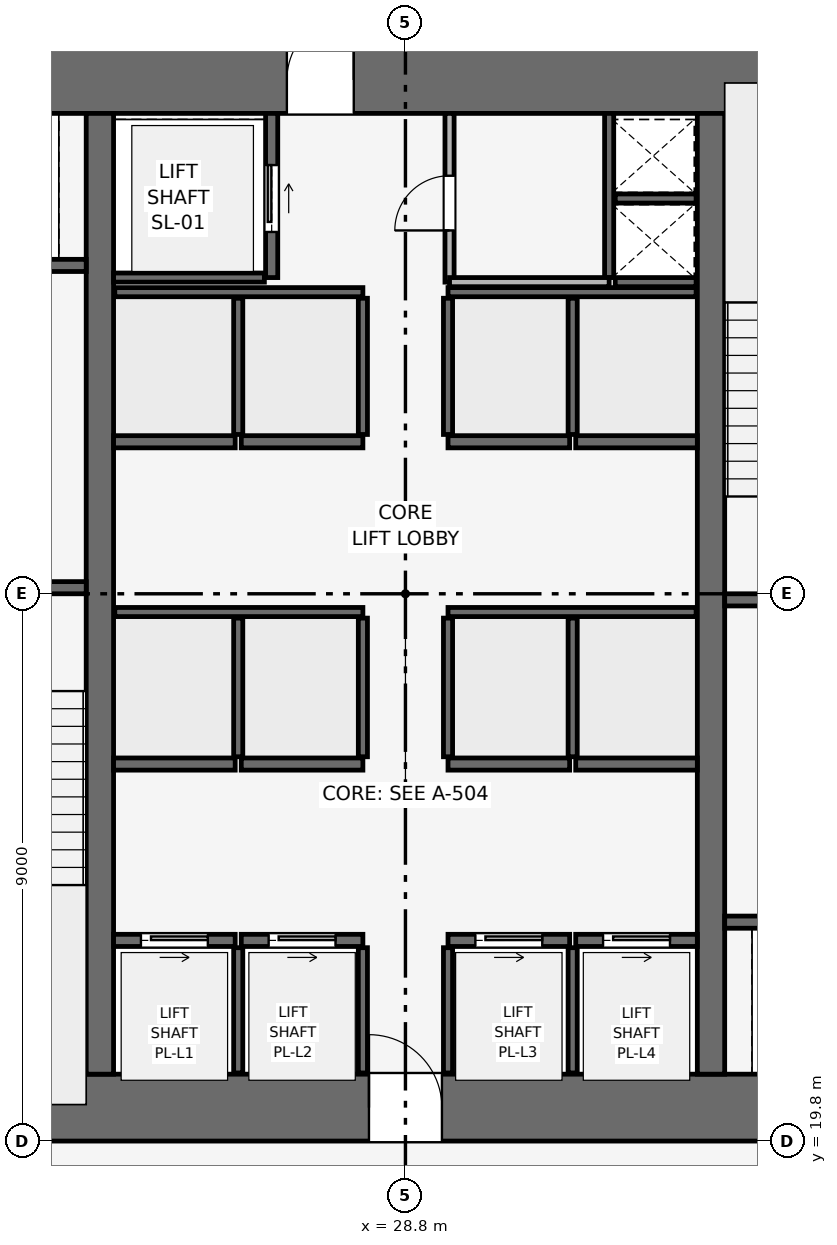
"""IFC4 building model, lengths in metres.
Left out: names, types, materials, properties, quantities, classifications, styles, units other than length and angle.
Written with IfcOpenShell. Run it as: python <this file> out.ifc"""

import sys

from ifc_helpers import new_model, si_unit, direction, frame, frame_2d, origin, place, context, subcontext, project, spatial, rectangle, extrude, element, fill, save


model = new_model("IFC4")
c1 = context("Model", 3, precision=1e-05, world=origin(), true_north=direction((0.0, 1.0)))
c2 = subcontext(c1, "Body", "Model", "MODEL_VIEW")
j1 = project(units=[si_unit("LENGTHUNIT", "METRE"), si_unit("PLANEANGLEUNIT", "RADIAN")], contexts=[c1])
p1 = place(None, origin())
s1 = spatial("IfcSite", under=j1, at=p1, CompositionType="ELEMENT")
p2 = place(p1, origin())
s2 = spatial("IfcBuilding", under=s1, at=p2, CompositionType="ELEMENT")
p3 = place(p2, frame((0.0, 0.0, 49.5)))
s3 = spatial("IfcBuildingStorey", under=s2, at=p3, CompositionType="ELEMENT", Elevation=49.5)
p4 = place(p3, frame((19.8, 20.35, 0.0), z_axis=(0.0, 0.0, 1.0), x_axis=(1.0, 0.0, 0.0)))
e1 = element("IfcWall", 1, at=p4, inside=s3, PredefinedType="SHEAR", context=c2, shape_type="SweptSolid", body=[
    extrude(rectangle(XDim=18.0, YDim=1.1, at=frame_2d((9.0, 0.0))), origin(), (0.0, 0.0, 1.0), 3.9),
])
p5 = place(p4, frame((8.4, 0.0, 0.0)))
e2 = element("IfcOpeningElement", 2, at=p5, cuts=e1, PredefinedType="OPENING", context=c2, shape_type="SweptSolid", body=[
    extrude(rectangle(XDim=1.2, YDim=2.2, at=frame_2d((0.6, 1.1))), frame((0.0, 0.56, 0.0), z_axis=(0.0, -1.0, 0.0), x_axis=(1.0, 0.0, 0.0)), (0.0, 0.0, 1.0), 1.12),
])
p6 = place(p3, frame((19.8, 37.25, 0.0), z_axis=(0.0, 0.0, 1.0), x_axis=(1.0, 0.0, 0.0)))
e3 = element("IfcWall", 3, at=p6, inside=s3, PredefinedType="SHEAR", context=c2, shape_type="SweptSolid", body=[
    extrude(rectangle(XDim=18.0, YDim=1.1, at=frame_2d((9.0, 0.0))), origin(), (0.0, 0.0, 1.0), 3.9),
])
p7 = place(p6, frame((7.05, 0.0, 0.0)))
e4 = element("IfcOpeningElement", 4, at=p7, cuts=e3, PredefinedType="OPENING", context=c2, shape_type="SweptSolid", body=[
    extrude(rectangle(XDim=1.1, YDim=2.15, at=frame_2d((0.55, 1.075))), frame((0.0, 0.56, 0.0), z_axis=(0.0, -1.0, 0.0), x_axis=(1.0, 0.0, 0.0)), (0.0, 0.0, 1.0), 1.12),
])
for number, where, z_axis, x_axis in (
    (5, (23.775, 20.9, 0.0), (0.0, 0.0, 1.0), (0.0, 1.0, 0.0)),
    (6, (33.825, 20.9, 0.0), (0.0, 0.0, 1.0), (0.0, 1.0, 0.0)),
):
    element("IfcWall", number, at=place(p3, frame(where, z_axis=z_axis, x_axis=x_axis)), inside=s3, PredefinedType="SHEAR", context=c2, shape_type="SweptSolid", body=[
        extrude(rectangle(XDim=15.8, YDim=0.45, at=frame_2d((7.9, 0.0))), origin(), (0.0, 0.0, 1.0), 3.9),
    ])
p8 = place(p3, frame((20.4, 28.9, 0.0), z_axis=(0.0, 0.0, 1.0), x_axis=(1.0, 0.0, 0.0)))
e7 = element("IfcWall", 7, at=p8, inside=s3, PredefinedType="SHEAR", context=c2, shape_type="SweptSolid", body=[
    extrude(rectangle(XDim=3.15, YDim=0.2, at=frame_2d((1.575, 0.0))), origin(), (0.0, 0.0, 1.0), 3.65),
])
p9 = place(p8, frame((0.8, 0.0, 0.0)))
e8 = element("IfcOpeningElement", 8, at=p9, cuts=e7, PredefinedType="OPENING", context=c2, shape_type="SweptSolid", body=[
    extrude(rectangle(XDim=1.0, YDim=2.1, at=frame_2d((0.5, 1.05))), frame((0.0, 0.11, 0.0), z_axis=(0.0, -1.0, 0.0), x_axis=(1.0, 0.0, 0.0)), (0.0, 0.0, 1.0), 0.22),
])
p10 = place(p3, frame((34.05, 28.7, 0.0), z_axis=(0.0, 0.0, 1.0), x_axis=(1.0, 0.0, 0.0)))
e9 = element("IfcWall", 9, at=p10, inside=s3, PredefinedType="SHEAR", context=c2, shape_type="SweptSolid", body=[
    extrude(rectangle(XDim=3.15, YDim=0.2, at=frame_2d((1.575, 0.0))), origin(), (0.0, 0.0, 1.0), 3.65),
])
p11 = place(p10, frame((0.8, 0.0, 0.0)))
e10 = element("IfcOpeningElement", 10, at=p11, cuts=e9, PredefinedType="OPENING", context=c2, shape_type="SweptSolid", body=[
    extrude(rectangle(XDim=1.0, YDim=2.1, at=frame_2d((0.5, 1.05))), frame((0.0, 0.11, 0.0), z_axis=(0.0, -1.0, 0.0), x_axis=(1.0, 0.0, 0.0)), (0.0, 0.0, 1.0), 0.22),
])
p12 = place(p3, frame((32.15, 34.0, 0.0), z_axis=(0.0, 0.0, 1.0), x_axis=(0.0, 1.0, 0.0)))
e11 = element("IfcWall", 11, at=p12, inside=s3, PredefinedType="SHEAR", context=c2, shape_type="SweptSolid", body=[
    extrude(rectangle(XDim=2.7, YDim=0.15, at=frame_2d((1.35, 0.0))), origin(), (0.0, 0.0, 1.0), 3.65),
])
for number, where, z_axis, x_axis in (
    (12, (32.25, 33.925, 0.0), (0.0, 0.0, 1.0), (1.0, 0.0, 0.0)),
    (13, (32.25, 35.3, 0.0), (0.0, 0.0, 1.0), (1.0, 0.0, 0.0)),
):
    element("IfcWall", number, at=place(p3, frame(where, z_axis=z_axis, x_axis=x_axis)), inside=s3, PredefinedType="SHEAR", context=c2, shape_type="SweptSolid", body=[
        extrude(rectangle(XDim=1.33, YDim=0.15, at=frame_2d((0.665, 0.0))), origin(), (0.0, 0.0, 1.0), 3.65),
    ])
p13 = place(p3, frame((20.5, 34.2, 0.0), z_axis=(0.0, 0.0, 1.0), x_axis=(1.0, 0.0, 0.0)))
e14 = element("IfcWall", 14, at=p13, inside=s3, PredefinedType="SHEAR", context=c2, shape_type="SweptSolid", body=[
    extrude(rectangle(XDim=3.05, YDim=0.2, at=frame_2d((1.525, 0.0))), origin(), (0.0, 0.0, 1.0), 3.65),
])
p14 = place(p13, frame((0.75, 0.0, 0.0)))
e15 = element("IfcOpeningElement", 15, at=p14, cuts=e14, PredefinedType="OPENING", context=c2, shape_type="SweptSolid", body=[
    extrude(rectangle(XDim=1.1, YDim=2.15, at=frame_2d((0.55, 1.075))), frame((0.0, 0.11, 0.0), z_axis=(0.0, -1.0, 0.0), x_axis=(1.0, 0.0, 0.0)), (0.0, 0.0, 1.0), 0.22),
])
p15 = place(p3, frame((34.05, 23.4, 0.0), z_axis=(0.0, 0.0, 1.0), x_axis=(1.0, 0.0, 0.0)))
e16 = element("IfcWall", 16, at=p15, inside=s3, PredefinedType="SHEAR", context=c2, shape_type="SweptSolid", body=[
    extrude(rectangle(XDim=3.05, YDim=0.2, at=frame_2d((1.525, 0.0))), origin(), (0.0, 0.0, 1.0), 3.65),
])
p16 = place(p15, frame((1.2, 0.0, 0.0)))
e17 = element("IfcOpeningElement", 17, at=p16, cuts=e16, PredefinedType="OPENING", context=c2, shape_type="SweptSolid", body=[
    extrude(rectangle(XDim=1.1, YDim=2.15, at=frame_2d((0.55, 1.075))), frame((0.0, 0.11, 0.0), z_axis=(0.0, -1.0, 0.0), x_axis=(1.0, 0.0, 0.0)), (0.0, 0.0, 1.0), 0.22),
])
p17 = place(p3, frame((26.6, 34.0, 0.0), z_axis=(0.0, 0.0, 1.0), x_axis=(0.0, 1.0, 0.0)))
e18 = element("IfcWall", 18, at=p17, inside=s3, PredefinedType="SHEAR", context=c2, shape_type="SweptSolid", body=[
    extrude(rectangle(XDim=2.7, YDim=0.2, at=frame_2d((1.35, 0.0))), origin(), (0.0, 0.0, 1.0), 3.65),
])
p18 = place(p17, frame((0.75, 0.0, 0.0)))
e19 = element("IfcOpeningElement", 19, at=p18, cuts=e18, PredefinedType="OPENING", context=c2, shape_type="SweptSolid", body=[
    extrude(rectangle(XDim=1.1, YDim=2.15, at=frame_2d((0.55, 1.075))), frame((0.0, 0.11, 0.0), z_axis=(0.0, -1.0, 0.0), x_axis=(1.0, 0.0, 0.0)), (0.0, 0.0, 1.0), 0.22),
])
p19 = place(p3, frame((24.0, 34.0, 0.0), z_axis=(0.0, 0.0, 1.0), x_axis=(1.0, 0.0, 0.0)))
e20 = element("IfcWall", 20, at=p19, inside=s3, PredefinedType="SHEAR", context=c2, shape_type="SweptSolid", body=[
    extrude(rectangle(XDim=2.48, YDim=0.15, at=frame_2d((1.24, 0.0))), origin(), (0.0, 0.0, 1.0), 3.65),
])
p20 = place(p3, frame((24.0, 23.1, 0.0), z_axis=(0.0, 0.0, 1.0), x_axis=(1.0, 0.0, 0.0)))
e21 = element("IfcWall", 21, at=p20, inside=s3, PredefinedType="SHEAR", context=c2, shape_type="SweptSolid", body=[
    extrude(rectangle(XDim=2.0, YDim=0.2, at=frame_2d((1.0, 0.0))), origin(), (0.0, 0.0, 1.0), 3.65),
])
p21 = place(p20, frame((0.45, 0.0, 0.0)))
e22 = element("IfcOpeningElement", 22, at=p21, cuts=e21, PredefinedType="OPENING", context=c2, shape_type="SweptSolid", body=[
    extrude(rectangle(XDim=1.1, YDim=2.15, at=frame_2d((0.55, 1.075))), frame((0.0, 0.11, 0.0), z_axis=(0.0, -1.0, 0.0), x_axis=(1.0, 0.0, 0.0)), (0.0, 0.0, 1.0), 0.22),
])
p22 = place(p3, frame((26.1, 23.1, 0.0), z_axis=(0.0, 0.0, 1.0), x_axis=(1.0, 0.0, 0.0)))
e23 = element("IfcWall", 23, at=p22, inside=s3, PredefinedType="SHEAR", context=c2, shape_type="SweptSolid", body=[
    extrude(rectangle(XDim=2.0, YDim=0.2, at=frame_2d((1.0, 0.0))), origin(), (0.0, 0.0, 1.0), 3.65),
])
p23 = place(p22, frame((0.45, 0.0, 0.0)))
e24 = element("IfcOpeningElement", 24, at=p23, cuts=e23, PredefinedType="OPENING", context=c2, shape_type="SweptSolid", body=[
    extrude(rectangle(XDim=1.1, YDim=2.15, at=frame_2d((0.55, 1.075))), frame((0.0, 0.11, 0.0), z_axis=(0.0, -1.0, 0.0), x_axis=(1.0, 0.0, 0.0)), (0.0, 0.0, 1.0), 0.22),
])
p24 = place(p3, frame((29.5, 23.1, 0.0), z_axis=(0.0, 0.0, 1.0), x_axis=(1.0, 0.0, 0.0)))
e25 = element("IfcWall", 25, at=p24, inside=s3, PredefinedType="SHEAR", context=c2, shape_type="SweptSolid", body=[
    extrude(rectangle(XDim=2.0, YDim=0.2, at=frame_2d((1.0, 0.0))), origin(), (0.0, 0.0, 1.0), 3.65),
])
p25 = place(p24, frame((0.45, 0.0, 0.0)))
e26 = element("IfcOpeningElement", 26, at=p25, cuts=e25, PredefinedType="OPENING", context=c2, shape_type="SweptSolid", body=[
    extrude(rectangle(XDim=1.1, YDim=2.15, at=frame_2d((0.55, 1.075))), frame((0.0, 0.11, 0.0), z_axis=(0.0, -1.0, 0.0), x_axis=(1.0, 0.0, 0.0)), (0.0, 0.0, 1.0), 0.22),
])
p26 = place(p3, frame((31.6, 23.1, 0.0), z_axis=(0.0, 0.0, 1.0), x_axis=(1.0, 0.0, 0.0)))
e27 = element("IfcWall", 27, at=p26, inside=s3, PredefinedType="SHEAR", context=c2, shape_type="SweptSolid", body=[
    extrude(rectangle(XDim=2.0, YDim=0.2, at=frame_2d((1.0, 0.0))), origin(), (0.0, 0.0, 1.0), 3.65),
])
p27 = place(p26, frame((0.45, 0.0, 0.0)))
e28 = element("IfcOpeningElement", 28, at=p27, cuts=e27, PredefinedType="OPENING", context=c2, shape_type="SweptSolid", body=[
    extrude(rectangle(XDim=1.1, YDim=2.15, at=frame_2d((0.55, 1.075))), frame((0.0, 0.11, 0.0), z_axis=(0.0, -1.0, 0.0), x_axis=(1.0, 0.0, 0.0)), (0.0, 0.0, 1.0), 0.22),
])
for number, where, z_axis, x_axis in (
    (29, (24.0, 26.0, 0.0), (0.0, 0.0, 1.0), (1.0, 0.0, 0.0)),
    (30, (26.1, 26.0, 0.0), (0.0, 0.0, 1.0), (1.0, 0.0, 0.0)),
    (31, (29.5, 26.0, 0.0), (0.0, 0.0, 1.0), (1.0, 0.0, 0.0)),
    (32, (31.6, 26.0, 0.0), (0.0, 0.0, 1.0), (1.0, 0.0, 0.0)),
    (33, (24.0, 31.3, 0.0), (0.0, 0.0, 1.0), (1.0, 0.0, 0.0)),
    (34, (26.1, 31.3, 0.0), (0.0, 0.0, 1.0), (1.0, 0.0, 0.0)),
    (35, (29.5, 31.3, 0.0), (0.0, 0.0, 1.0), (1.0, 0.0, 0.0)),
    (36, (31.6, 31.3, 0.0), (0.0, 0.0, 1.0), (1.0, 0.0, 0.0)),
):
    element("IfcWall", number, at=place(p3, frame(where, z_axis=z_axis, x_axis=x_axis)), inside=s3, PredefinedType="SHEAR", context=c2, shape_type="SweptSolid", body=[
        extrude(rectangle(XDim=2.0, YDim=0.2, at=frame_2d((1.0, 0.0))), origin(), (0.0, 0.0, 1.0), 3.65),
    ])
for number, where, z_axis, x_axis in (
    (37, (26.05, 20.92, 0.0), (0.0, 0.0, 1.0), (0.0, 1.0, 0.0)),
    (38, (28.1, 20.92, 0.0), (0.0, 0.0, 1.0), (0.0, 1.0, 0.0)),
    (39, (29.5, 20.92, 0.0), (0.0, 0.0, 1.0), (0.0, 1.0, 0.0)),
    (40, (31.55, 20.92, 0.0), (0.0, 0.0, 1.0), (0.0, 1.0, 0.0)),
):
    element("IfcWall", number, at=place(p3, frame(where, z_axis=z_axis, x_axis=x_axis)), inside=s3, PredefinedType="SHEAR", context=c2, shape_type="SweptSolid", body=[
        extrude(rectangle(XDim=2.06, YDim=0.15, at=frame_2d((1.03, 0.0))), origin(), (0.0, 0.0, 1.0), 3.65),
    ])
for number, where, z_axis, x_axis in (
    (41, (24.02, 28.5, 0.0), (0.0, 0.0, 1.0), (1.0, 0.0, 0.0)),
    (42, (29.5, 28.5, 0.0), (0.0, 0.0, 1.0), (1.0, 0.0, 0.0)),
):
    element("IfcWall", number, at=place(p3, frame(where, z_axis=z_axis, x_axis=x_axis)), inside=s3, PredefinedType="SHEAR", context=c2, shape_type="SweptSolid", body=[
        extrude(rectangle(XDim=4.08, YDim=0.15, at=frame_2d((2.04, 0.0))), origin(), (0.0, 0.0, 1.0), 3.65),
    ])
for number, where, z_axis, x_axis in (
    (43, (26.05, 26.12, 0.0), (0.0, 0.0, 1.0), (0.0, 1.0, 0.0)),
    (44, (28.1, 26.12, 0.0), (0.0, 0.0, 1.0), (0.0, 1.0, 0.0)),
    (45, (29.5, 26.12, 0.0), (0.0, 0.0, 1.0), (0.0, 1.0, 0.0)),
    (46, (31.55, 26.12, 0.0), (0.0, 0.0, 1.0), (0.0, 1.0, 0.0)),
):
    element("IfcWall", number, at=place(p3, frame(where, z_axis=z_axis, x_axis=x_axis)), inside=s3, PredefinedType="SHEAR", context=c2, shape_type="SweptSolid", body=[
        extrude(rectangle(XDim=2.28, YDim=0.15, at=frame_2d((1.14, 0.0))), origin(), (0.0, 0.0, 1.0), 3.65),
    ])
for number, where, z_axis, x_axis in (
    (47, (24.02, 33.76, 0.0), (0.0, 0.0, 1.0), (1.0, 0.0, 0.0)),
    (48, (29.5, 33.76, 0.0), (0.0, 0.0, 1.0), (1.0, 0.0, 0.0)),
):
    element("IfcWall", number, at=place(p3, frame(where, z_axis=z_axis, x_axis=x_axis)), inside=s3, PredefinedType="SHEAR", context=c2, shape_type="SweptSolid", body=[
        extrude(rectangle(XDim=4.08, YDim=0.15, at=frame_2d((2.04, 0.0))), origin(), (0.0, 0.0, 1.0), 3.65),
    ])
for number, where, z_axis, x_axis in (
    (49, (26.05, 31.42, 0.0), (0.0, 0.0, 1.0), (0.0, 1.0, 0.0)),
    (50, (28.1, 31.42, 0.0), (0.0, 0.0, 1.0), (0.0, 1.0, 0.0)),
    (51, (29.5, 31.42, 0.0), (0.0, 0.0, 1.0), (0.0, 1.0, 0.0)),
    (52, (31.55, 31.42, 0.0), (0.0, 0.0, 1.0), (0.0, 1.0, 0.0)),
):
    element("IfcWall", number, at=place(p3, frame(where, z_axis=z_axis, x_axis=x_axis)), inside=s3, PredefinedType="SHEAR", context=c2, shape_type="SweptSolid", body=[
        extrude(rectangle(XDim=2.24, YDim=0.15, at=frame_2d((1.12, 0.0))), origin(), (0.0, 0.0, 1.0), 3.65),
    ])
p28 = place(p3, frame((29.525, 33.925, 0.0), z_axis=(0.0, 0.0, 1.0), x_axis=(0.0, 1.0, 0.0)))
e53 = element("IfcWall", 53, at=p28, inside=s3, PredefinedType="PARTITIONING", context=c2, shape_type="SweptSolid", body=[
    extrude(rectangle(XDim=2.775, YDim=0.15, at=frame_2d((1.387, 0.0))), origin(), (0.0, 0.0, 1.0), 3.65),
])
p29 = place(p28, frame((0.85, 0.0, 0.0)))
e54 = element("IfcOpeningElement", 54, at=p29, cuts=e53, PredefinedType="OPENING", context=c2, shape_type="SweptSolid", body=[
    extrude(rectangle(XDim=0.9, YDim=2.1, at=frame_2d((0.45, 1.05))), frame((0.0, 0.085, 0.0), z_axis=(0.0, -1.0, 0.0), x_axis=(1.0, 0.0, 0.0)), (0.0, 0.0, 1.0), 0.17),
])
p30 = place(p3, frame((29.525, 33.925, 0.0), z_axis=(0.0, 0.0, 1.0), x_axis=(1.0, 0.0, 0.0)))
e55 = element("IfcWall", 55, at=p30, inside=s3, PredefinedType="PARTITIONING", context=c2, shape_type="SweptSolid", body=[
    extrude(rectangle(XDim=2.625, YDim=0.15, at=frame_2d((1.312, 0.0))), origin(), (0.0, 0.0, 1.0), 3.65),
])
p31 = place(p18, origin())
e56 = element("IfcDoor", 56, at=p31, inside=s3, OperationType="SLIDING_TO_RIGHT", PredefinedType="DOOR", context=c2, shape_type="SweptSolid", body=[
    extrude(rectangle(XDim=1.1, YDim=2.15, at=frame_2d((0.55, 1.075))), frame((0.0, 0.025, 0.0), z_axis=(0.0, -1.0, 0.0), x_axis=(1.0, 0.0, 0.0)), (0.0, 0.0, 1.0), 0.05),
])
fill(e19, e56)
p32 = place(p21, origin())
e57 = element("IfcDoor", 57, at=p32, inside=s3, OperationType="SLIDING_TO_RIGHT", PredefinedType="DOOR", context=c2, shape_type="SweptSolid", body=[
    extrude(rectangle(XDim=1.1, YDim=2.15, at=frame_2d((0.55, 1.075))), frame((0.0, 0.025, 0.0), z_axis=(0.0, -1.0, 0.0), x_axis=(1.0, 0.0, 0.0)), (0.0, 0.0, 1.0), 0.05),
])
fill(e22, e57)
p33 = place(p23, origin())
e58 = element("IfcDoor", 58, at=p33, inside=s3, OperationType="SLIDING_TO_RIGHT", PredefinedType="DOOR", context=c2, shape_type="SweptSolid", body=[
    extrude(rectangle(XDim=1.1, YDim=2.15, at=frame_2d((0.55, 1.075))), frame((0.0, 0.025, 0.0), z_axis=(0.0, -1.0, 0.0), x_axis=(1.0, 0.0, 0.0)), (0.0, 0.0, 1.0), 0.05),
])
fill(e24, e58)
p34 = place(p25, origin())
e59 = element("IfcDoor", 59, at=p34, inside=s3, OperationType="SLIDING_TO_RIGHT", PredefinedType="DOOR", context=c2, shape_type="SweptSolid", body=[
    extrude(rectangle(XDim=1.1, YDim=2.15, at=frame_2d((0.55, 1.075))), frame((0.0, 0.025, 0.0), z_axis=(0.0, -1.0, 0.0), x_axis=(1.0, 0.0, 0.0)), (0.0, 0.0, 1.0), 0.05),
])
fill(e26, e59)
p35 = place(p27, origin())
e60 = element("IfcDoor", 60, at=p35, inside=s3, OperationType="SLIDING_TO_RIGHT", PredefinedType="DOOR", context=c2, shape_type="SweptSolid", body=[
    extrude(rectangle(XDim=1.1, YDim=2.15, at=frame_2d((0.55, 1.075))), frame((0.0, 0.025, 0.0), z_axis=(0.0, -1.0, 0.0), x_axis=(1.0, 0.0, 0.0)), (0.0, 0.0, 1.0), 0.05),
])
fill(e28, e60)
p36 = place(p29, origin())
e61 = element("IfcDoor", 61, at=p36, inside=s3, OperationType="SINGLE_SWING_LEFT", PredefinedType="DOOR", context=c2, shape_type="SweptSolid", body=[
    extrude(rectangle(XDim=0.9, YDim=2.1, at=frame_2d((0.45, 1.05))), frame((0.0, 0.025, 0.0), z_axis=(0.0, -1.0, 0.0), x_axis=(1.0, 0.0, 0.0)), (0.0, 0.0, 1.0), 0.05),
])
fill(e54, e61)
p37 = place(p5, origin())
e62 = element("IfcDoor", 62, at=p37, inside=s3, OperationType="SINGLE_SWING_LEFT", PredefinedType="DOOR", context=c2, shape_type="SweptSolid", body=[
    extrude(rectangle(XDim=1.2, YDim=2.2, at=frame_2d((0.6, 1.1))), frame((0.0, 0.025, 0.0), z_axis=(0.0, -1.0, 0.0), x_axis=(1.0, 0.0, 0.0)), (0.0, 0.0, 1.0), 0.05),
])
fill(e2, e62)
p38 = place(p7, origin())
e63 = element("IfcDoor", 63, at=p38, inside=s3, OperationType="SINGLE_SWING_RIGHT", PredefinedType="DOOR", context=c2, shape_type="SweptSolid", body=[
    extrude(rectangle(XDim=1.1, YDim=2.15, at=frame_2d((0.55, 1.075))), frame((0.0, 0.025, 0.0), z_axis=(0.0, -1.0, 0.0), x_axis=(1.0, 0.0, 0.0)), (0.0, 0.0, 1.0), 0.05),
])
fill(e4, e63)
save(model, sys.argv[1])
